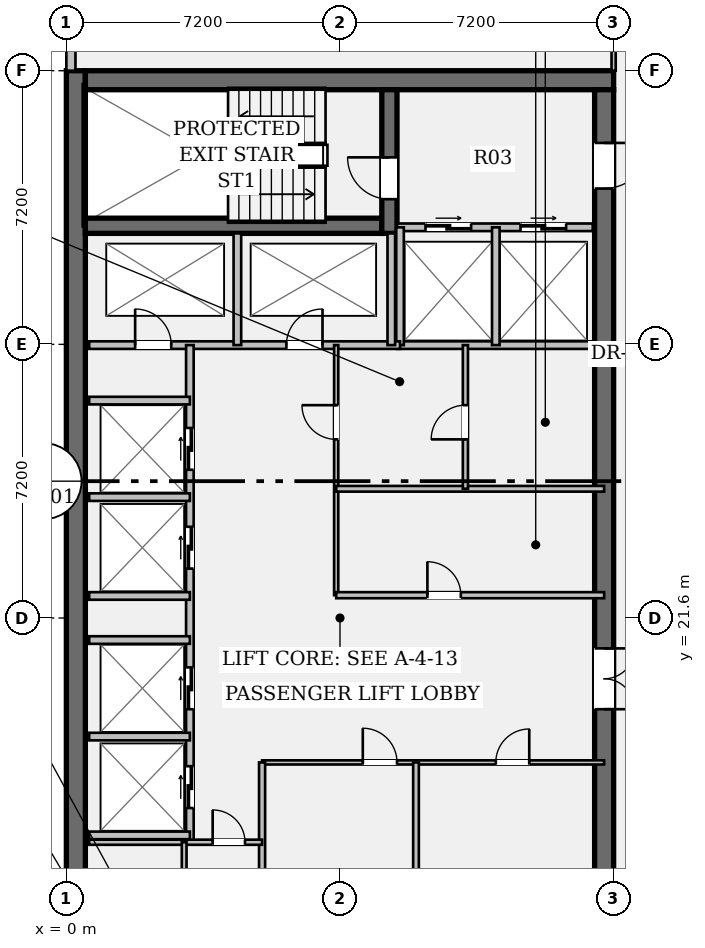
"""IFC4 building model, lengths in metres.
Left out: names, types, materials, properties, quantities, classifications, styles, units other than length and angle.
Written with IfcOpenShell. Run it as: python <this file> out.ifc"""

import sys

from ifc_helpers import new_model, si_unit, direction, frame, frame_2d, origin, place, context, subcontext, project, spatial, rectangle, extrude, element, fill, save


model = new_model("IFC4")
c1 = context("Model", 3, precision=1e-05, world=origin(), true_north=direction((0.0, 1.0)))
c2 = subcontext(c1, "Body", "Model", "MODEL_VIEW")
j1 = project(units=[si_unit("LENGTHUNIT", "METRE"), si_unit("PLANEANGLEUNIT", "RADIAN")], contexts=[c1])
p1 = place(None, origin())
s1 = spatial("IfcSite", under=j1, at=p1, CompositionType="ELEMENT")
p2 = place(p1, origin())
s2 = spatial("IfcBuilding", under=s1, at=p2, CompositionType="ELEMENT")
p3 = place(p2, frame((0.0, 0.0, 255.15)))
s3 = spatial("IfcBuildingStorey", under=s2, at=p3, CompositionType="ELEMENT", Elevation=255.15)
p4 = place(p3, frame((0.25, 7.2, 0.0), z_axis=(0.0, 0.0, 1.0), x_axis=(0.0, 1.0, 0.0)))
e1 = element("IfcWall", 1, at=p4, inside=s3, PredefinedType="SHEAR", context=c2, shape_type="SweptSolid", body=[
    extrude(rectangle(XDim=28.8, YDim=0.5, at=frame_2d((14.4, 0.0))), origin(), (0.0, 0.0, 1.0), 3.24),
])
p5 = place(p3, frame((0.5, 35.75, 0.0), z_axis=(0.0, 0.0, 1.0), x_axis=(1.0, 0.0, 0.0)))
e2 = element("IfcWall", 2, at=p5, inside=s3, PredefinedType="SHEAR", context=c2, shape_type="SweptSolid", body=[
    extrude(rectangle(XDim=13.9, YDim=0.5, at=frame_2d((6.95, 0.0))), origin(), (0.0, 0.0, 1.0), 3.24),
])
p6 = place(p3, frame((14.15, 35.5, 0.0), z_axis=(0.0, 0.0, 1.0), x_axis=(0.0, -1.0, 0.0)))
e3 = element("IfcWall", 3, at=p6, inside=s3, PredefinedType="SHEAR", context=c2, shape_type="SweptSolid", body=[
    extrude(rectangle(XDim=27.8, YDim=0.5, at=frame_2d((13.9, 0.0))), origin(), (0.0, 0.0, 1.0), 3.24),
])
p7 = place(p6, frame((1.4, 0.0, 0.0)))
e4 = element("IfcOpeningElement", 4, at=p7, cuts=e3, PredefinedType="OPENING", context=c2, shape_type="SweptSolid", body=[
    extrude(rectangle(XDim=1.2, YDim=2.15, at=frame_2d((0.6, 1.075))), frame((0.0, 0.262, 0.0), z_axis=(0.0, -1.0, 0.0), x_axis=(1.0, 0.0, 0.0)), (0.0, 0.0, 1.0), 0.524),
])
p8 = place(p6, frame((25.35, 0.0, 0.0)))
e5 = element("IfcOpeningElement", 5, at=p8, cuts=e3, PredefinedType="OPENING", context=c2, shape_type="SweptSolid", body=[
    extrude(rectangle(XDim=1.2, YDim=2.15, at=frame_2d((0.6, 1.075))), frame((0.0, 0.262, 0.0), z_axis=(0.0, -1.0, 0.0), x_axis=(1.0, 0.0, 0.0)), (0.0, 0.0, 1.0), 0.524),
])
p9 = place(p6, frame((14.7, 0.0, 0.0)))
e6 = element("IfcOpeningElement", 6, at=p9, cuts=e3, PredefinedType="OPENING", context=c2, shape_type="SweptSolid", body=[
    extrude(rectangle(XDim=1.6, YDim=2.2, at=frame_2d((0.8, 1.1))), frame((0.0, 0.262, 0.0), z_axis=(0.0, -1.0, 0.0), x_axis=(1.0, 0.0, 0.0)), (0.0, 0.0, 1.0), 0.524),
])
p10 = place(p3, frame((0.5, 31.92, 0.0), z_axis=(0.0, 0.0, 1.0), x_axis=(1.0, 0.0, 0.0)))
e7 = element("IfcWall", 7, at=p10, inside=s3, PredefinedType="SHEAR", context=c2, shape_type="SweptSolid", body=[
    extrude(rectangle(XDim=7.8, YDim=0.4, at=frame_2d((3.9, 0.0))), origin(), (0.0, 0.0, 1.0), 3.24),
])
p11 = place(p3, frame((8.5, 31.72, 0.0), z_axis=(0.0, 0.0, 1.0), x_axis=(0.0, 1.0, 0.0)))
e8 = element("IfcWall", 8, at=p11, inside=s3, PredefinedType="SHEAR", context=c2, shape_type="SweptSolid", body=[
    extrude(rectangle(XDim=3.78, YDim=0.4, at=frame_2d((1.89, 0.0))), origin(), (0.0, 0.0, 1.0), 3.24),
])
p12 = place(p11, frame((0.9, 0.0, 0.0)))
e9 = element("IfcOpeningElement", 9, at=p12, cuts=e8, PredefinedType="OPENING", context=c2, shape_type="SweptSolid", body=[
    extrude(rectangle(XDim=1.1, YDim=2.15, at=frame_2d((0.55, 1.075))), frame((0.0, 0.212, 0.0), z_axis=(0.0, -1.0, 0.0), x_axis=(1.0, 0.0, 0.0)), (0.0, 0.0, 1.0), 0.424),
])
p13 = place(p3, frame((0.12, 36.0, 0.0), z_axis=(0.0, 0.0, 1.0), x_axis=(0.0, 1.0, 0.0)))
e10 = element("IfcWall", 10, at=p13, inside=s3, PredefinedType="STANDARD", context=c2, shape_type="SweptSolid", body=[
    extrude(rectangle(XDim=1.33, YDim=0.24, at=frame_2d((0.665, 0.0))), origin(), (0.0, 0.0, 1.0), 3.24),
])
p14 = place(p3, frame((8.7, 31.88, 0.0), z_axis=(0.0, 0.0, 1.0), x_axis=(1.0, 0.0, 0.0)))
e11 = element("IfcWall", 11, at=p14, inside=s3, PredefinedType="PARTITIONING", context=c2, shape_type="SweptSolid", body=[
    extrude(rectangle(XDim=5.15, YDim=0.2, at=frame_2d((2.575, 0.0))), origin(), (0.0, 0.0, 1.0), 3.24),
])
p15 = place(p14, frame((0.75, 0.0, 0.0)))
e12 = element("IfcOpeningElement", 12, at=p15, cuts=e11, PredefinedType="OPENING", context=c2, shape_type="SweptSolid", body=[
    extrude(rectangle(XDim=1.2, YDim=2.2, at=frame_2d((0.6, 1.1))), frame((0.0, 0.112, 0.0), z_axis=(0.0, -1.0, 0.0), x_axis=(1.0, 0.0, 0.0)), (0.0, 0.0, 1.0), 0.224),
])
p16 = place(p14, frame((3.25, 0.0, 0.0)))
e13 = element("IfcOpeningElement", 13, at=p16, cuts=e11, PredefinedType="OPENING", context=c2, shape_type="SweptSolid", body=[
    extrude(rectangle(XDim=1.2, YDim=2.2, at=frame_2d((0.6, 1.1))), frame((0.0, 0.112, 0.0), z_axis=(0.0, -1.0, 0.0), x_axis=(1.0, 0.0, 0.0)), (0.0, 0.0, 1.0), 0.224),
])
p17 = place(p3, frame((8.7, 28.78, 0.0), z_axis=(0.0, 0.0, 1.0), x_axis=(1.0, 0.0, 0.0)))
e14 = element("IfcWall", 14, at=p17, inside=s3, PredefinedType="PARTITIONING", context=c2, shape_type="SweptSolid", body=[
    extrude(rectangle(XDim=5.15, YDim=0.2, at=frame_2d((2.575, 0.0))), origin(), (0.0, 0.0, 1.0), 3.24),
])
for number, where, z_axis, x_axis in (
    (15, (8.78, 28.78, 0.0), (0.0, 0.0, 1.0), (0.0, 1.0, 0.0)),
    (16, (11.3, 28.78, 0.0), (0.0, 0.0, 1.0), (0.0, 1.0, 0.0)),
):
    element("IfcWall", number, at=place(p3, frame(where, z_axis=z_axis, x_axis=x_axis)), inside=s3, PredefinedType="PARTITIONING", context=c2, shape_type="SweptSolid", body=[
        extrude(rectangle(XDim=3.1, YDim=0.2, at=frame_2d((1.55, 0.0))), origin(), (0.0, 0.0, 1.0), 3.24),
    ])
p18 = place(p3, frame((0.6, 28.78, 0.0), z_axis=(0.0, 0.0, 1.0), x_axis=(1.0, 0.0, 0.0)))
e17 = element("IfcWall", 17, at=p18, inside=s3, PredefinedType="PARTITIONING", context=c2, shape_type="SweptSolid", body=[
    extrude(rectangle(XDim=8.18, YDim=0.2, at=frame_2d((4.09, 0.0))), origin(), (0.0, 0.0, 1.0), 3.24),
])
p19 = place(p18, frame((1.21, 0.0, 0.0)))
e18 = element("IfcOpeningElement", 18, at=p19, cuts=e17, PredefinedType="OPENING", context=c2, shape_type="SweptSolid", body=[
    extrude(rectangle(XDim=0.95, YDim=2.15, at=frame_2d((0.475, 1.075))), frame((0.0, 0.112, 0.0), z_axis=(0.0, -1.0, 0.0), x_axis=(1.0, 0.0, 0.0)), (0.0, 0.0, 1.0), 0.224),
])
p20 = place(p18, frame((5.19, 0.0, 0.0)))
e19 = element("IfcOpeningElement", 19, at=p20, cuts=e17, PredefinedType="OPENING", context=c2, shape_type="SweptSolid", body=[
    extrude(rectangle(XDim=0.95, YDim=2.15, at=frame_2d((0.475, 1.075))), frame((0.0, 0.112, 0.0), z_axis=(0.0, -1.0, 0.0), x_axis=(1.0, 0.0, 0.0)), (0.0, 0.0, 1.0), 0.224),
])
for number, where, z_axis, x_axis in (
    (20, (4.5, 28.78, 0.0), (0.0, 0.0, 1.0), (0.0, 1.0, 0.0)),
    (21, (8.55, 28.78, 0.0), (0.0, 0.0, 1.0), (0.0, 1.0, 0.0)),
):
    element("IfcWall", number, at=place(p3, frame(where, z_axis=z_axis, x_axis=x_axis)), inside=s3, PredefinedType="PARTITIONING", context=c2, shape_type="SweptSolid", body=[
        extrude(rectangle(XDim=2.94, YDim=0.2, at=frame_2d((1.47, 0.0))), origin(), (0.0, 0.0, 1.0), 3.24),
    ])
p21 = place(p3, frame((3.25, 15.7, 0.0), z_axis=(0.0, 0.0, 1.0), x_axis=(0.0, 1.0, 0.0)))
e22 = element("IfcWall", 22, at=p21, inside=s3, PredefinedType="PARTITIONING", context=c2, shape_type="SweptSolid", body=[
    extrude(rectangle(XDim=13.08, YDim=0.2, at=frame_2d((6.54, 0.0))), origin(), (0.0, 0.0, 1.0), 3.24),
])
p22 = place(p21, frame((0.9, 0.0, 0.0)))
e23 = element("IfcOpeningElement", 23, at=p22, cuts=e22, PredefinedType="OPENING", context=c2, shape_type="SweptSolid", body=[
    extrude(rectangle(XDim=1.1, YDim=2.2, at=frame_2d((0.55, 1.1))), frame((0.0, 0.112, 0.0), z_axis=(0.0, -1.0, 0.0), x_axis=(1.0, 0.0, 0.0)), (0.0, 0.0, 1.0), 0.224),
])
p23 = place(p21, frame((3.5, 0.0, 0.0)))
e24 = element("IfcOpeningElement", 24, at=p23, cuts=e22, PredefinedType="OPENING", context=c2, shape_type="SweptSolid", body=[
    extrude(rectangle(XDim=1.1, YDim=2.2, at=frame_2d((0.55, 1.1))), frame((0.0, 0.112, 0.0), z_axis=(0.0, -1.0, 0.0), x_axis=(1.0, 0.0, 0.0)), (0.0, 0.0, 1.0), 0.224),
])
p24 = place(p21, frame((7.2, 0.0, 0.0)))
e25 = element("IfcOpeningElement", 25, at=p24, cuts=e22, PredefinedType="OPENING", context=c2, shape_type="SweptSolid", body=[
    extrude(rectangle(XDim=1.1, YDim=2.2, at=frame_2d((0.55, 1.1))), frame((0.0, 0.112, 0.0), z_axis=(0.0, -1.0, 0.0), x_axis=(1.0, 0.0, 0.0)), (0.0, 0.0, 1.0), 0.224),
])
p25 = place(p21, frame((9.8, 0.0, 0.0)))
e26 = element("IfcOpeningElement", 26, at=p25, cuts=e22, PredefinedType="OPENING", context=c2, shape_type="SweptSolid", body=[
    extrude(rectangle(XDim=1.1, YDim=2.2, at=frame_2d((0.55, 1.1))), frame((0.0, 0.112, 0.0), z_axis=(0.0, -1.0, 0.0), x_axis=(1.0, 0.0, 0.0)), (0.0, 0.0, 1.0), 0.224),
])
for number, where, z_axis, x_axis in (
    (27, (0.6, 15.88, 0.0), (0.0, 0.0, 1.0), (1.0, 0.0, 0.0)),
    (28, (0.6, 18.48, 0.0), (0.0, 0.0, 1.0), (1.0, 0.0, 0.0)),
    (29, (0.6, 22.18, 0.0), (0.0, 0.0, 1.0), (1.0, 0.0, 0.0)),
    (30, (0.6, 24.78, 0.0), (0.0, 0.0, 1.0), (1.0, 0.0, 0.0)),
    (31, (0.6, 21.02, 0.0), (0.0, 0.0, 1.0), (1.0, 0.0, 0.0)),
    (32, (0.6, 27.32, 0.0), (0.0, 0.0, 1.0), (1.0, 0.0, 0.0)),
):
    element("IfcWall", number, at=place(p3, frame(where, z_axis=z_axis, x_axis=x_axis)), inside=s3, PredefinedType="PARTITIONING", context=c2, shape_type="SweptSolid", body=[
        extrude(rectangle(XDim=2.65, YDim=0.2, at=frame_2d((1.325, 0.0))), origin(), (0.0, 0.0, 1.0), 3.24),
    ])
p26 = place(p3, frame((7.1, 22.2, 0.0), z_axis=(0.0, 0.0, 1.0), x_axis=(0.0, 1.0, 0.0)))
e33 = element("IfcWall", 33, at=p26, inside=s3, PredefinedType="PARTITIONING", context=c2, shape_type="SweptSolid", body=[
    extrude(rectangle(XDim=6.58, YDim=0.11, at=frame_2d((3.29, 0.0))), origin(), (0.0, 0.0, 1.0), 3.24),
])
p27 = place(p26, frame((4.1, 0.0, 0.0)))
e34 = element("IfcOpeningElement", 34, at=p27, cuts=e33, PredefinedType="OPENING", context=c2, shape_type="SweptSolid", body=[
    extrude(rectangle(XDim=0.9, YDim=2.15, at=frame_2d((0.45, 1.075))), frame((0.0, 0.067, 0.0), z_axis=(0.0, -1.0, 0.0), x_axis=(1.0, 0.0, 0.0)), (0.0, 0.0, 1.0), 0.134),
])
p28 = place(p3, frame((7.1, 22.2, 0.0), z_axis=(0.0, 0.0, 1.0), x_axis=(1.0, 0.0, 0.0)))
e35 = element("IfcWall", 35, at=p28, inside=s3, PredefinedType="PARTITIONING", context=c2, shape_type="SweptSolid", body=[
    extrude(rectangle(XDim=7.05, YDim=0.16, at=frame_2d((3.525, 0.0))), origin(), (0.0, 0.0, 1.0), 3.24),
])
p29 = place(p28, frame((2.4, 0.0, 0.0)))
e36 = element("IfcOpeningElement", 36, at=p29, cuts=e35, PredefinedType="OPENING", context=c2, shape_type="SweptSolid", body=[
    extrude(rectangle(XDim=0.88, YDim=2.15, at=frame_2d((0.44, 1.075))), frame((0.0, 0.092, 0.0), z_axis=(0.0, -1.0, 0.0), x_axis=(1.0, 0.0, 0.0)), (0.0, 0.0, 1.0), 0.184),
])
p30 = place(p3, frame((7.1, 25.0, 0.0), z_axis=(0.0, 0.0, 1.0), x_axis=(1.0, 0.0, 0.0)))
e37 = element("IfcWall", 37, at=p30, inside=s3, PredefinedType="PARTITIONING", context=c2, shape_type="SweptSolid", body=[
    extrude(rectangle(XDim=7.05, YDim=0.15, at=frame_2d((3.525, 0.0))), origin(), (0.0, 0.0, 1.0), 3.24),
])
p31 = place(p3, frame((10.5, 25.0, 0.0), z_axis=(0.0, 0.0, 1.0), x_axis=(0.0, 1.0, 0.0)))
e38 = element("IfcWall", 38, at=p31, inside=s3, PredefinedType="PARTITIONING", context=c2, shape_type="SweptSolid", body=[
    extrude(rectangle(XDim=3.78, YDim=0.135, at=frame_2d((1.89, 0.0))), origin(), (0.0, 0.0, 1.0), 3.24),
])
p32 = place(p31, frame((1.3, 0.0, 0.0)))
e39 = element("IfcOpeningElement", 39, at=p32, cuts=e38, PredefinedType="OPENING", context=c2, shape_type="SweptSolid", body=[
    extrude(rectangle(XDim=0.9, YDim=2.15, at=frame_2d((0.45, 1.075))), frame((0.0, 0.08, 0.0), z_axis=(0.0, -1.0, 0.0), x_axis=(1.0, 0.0, 0.0)), (0.0, 0.0, 1.0), 0.159),
])
p33 = place(p3, frame((5.15, 17.8, 0.0), z_axis=(0.0, 0.0, 1.0), x_axis=(1.0, 0.0, 0.0)))
e40 = element("IfcWall", 40, at=p33, inside=s3, PredefinedType="PARTITIONING", context=c2, shape_type="SweptSolid", body=[
    extrude(rectangle(XDim=9.0, YDim=0.11, at=frame_2d((4.5, 0.0))), origin(), (0.0, 0.0, 1.0), 3.24),
])
p34 = place(p33, frame((2.65, 0.0, 0.0)))
e41 = element("IfcOpeningElement", 41, at=p34, cuts=e40, PredefinedType="OPENING", context=c2, shape_type="SweptSolid", body=[
    extrude(rectangle(XDim=0.9, YDim=2.15, at=frame_2d((0.45, 1.075))), frame((0.0, 0.067, 0.0), z_axis=(0.0, -1.0, 0.0), x_axis=(1.0, 0.0, 0.0)), (0.0, 0.0, 1.0), 0.134),
])
p35 = place(p33, frame((6.15, 0.0, 0.0)))
e42 = element("IfcOpeningElement", 42, at=p35, cuts=e40, PredefinedType="OPENING", context=c2, shape_type="SweptSolid", body=[
    extrude(rectangle(XDim=0.88, YDim=2.15, at=frame_2d((0.44, 1.075))), frame((0.0, 0.067, 0.0), z_axis=(0.0, -1.0, 0.0), x_axis=(1.0, 0.0, 0.0)), (0.0, 0.0, 1.0), 0.134),
])
p36 = place(p3, frame((5.15, 11.2, 0.0), z_axis=(0.0, 0.0, 1.0), x_axis=(0.0, 1.0, 0.0)))
e43 = element("IfcWall", 43, at=p36, inside=s3, PredefinedType="PARTITIONING", context=c2, shape_type="SweptSolid", body=[
    extrude(rectangle(XDim=6.6, YDim=0.16, at=frame_2d((3.3, 0.0))), origin(), (0.0, 0.0, 1.0), 3.24),
])
p37 = place(p3, frame((9.2, 11.2, 0.0), z_axis=(0.0, 0.0, 1.0), x_axis=(0.0, 1.0, 0.0)))
e44 = element("IfcWall", 44, at=p37, inside=s3, PredefinedType="PARTITIONING", context=c2, shape_type="SweptSolid", body=[
    extrude(rectangle(XDim=6.6, YDim=0.15, at=frame_2d((3.3, 0.0))), origin(), (0.0, 0.0, 1.0), 3.24),
])
p38 = place(p3, frame((0.6, 15.7, 0.0), z_axis=(0.0, 0.0, 1.0), x_axis=(1.0, 0.0, 0.0)))
e45 = element("IfcWall", 45, at=p38, inside=s3, PredefinedType="PARTITIONING", context=c2, shape_type="SweptSolid", body=[
    extrude(rectangle(XDim=4.55, YDim=0.135, at=frame_2d((2.275, 0.0))), origin(), (0.0, 0.0, 1.0), 3.24),
])
p39 = place(p38, frame((3.25, 0.0, 0.0)))
e46 = element("IfcOpeningElement", 46, at=p39, cuts=e45, PredefinedType="OPENING", context=c2, shape_type="SweptSolid", body=[
    extrude(rectangle(XDim=0.85, YDim=2.15, at=frame_2d((0.425, 1.075))), frame((0.0, 0.08, 0.0), z_axis=(0.0, -1.0, 0.0), x_axis=(1.0, 0.0, 0.0)), (0.0, 0.0, 1.0), 0.159),
])
p40 = place(p3, frame((3.1, 11.28, 0.0), z_axis=(0.0, 0.0, 1.0), x_axis=(0.0, 1.0, 0.0)))
e47 = element("IfcWall", 47, at=p40, inside=s3, PredefinedType="PARTITIONING", context=c2, shape_type="SweptSolid", body=[
    extrude(rectangle(XDim=4.42, YDim=0.125, at=frame_2d((2.21, 0.0))), origin(), (0.0, 0.0, 1.0), 3.24),
])
p41 = place(p40, frame((0.65, 0.0, 0.0)))
e48 = element("IfcOpeningElement", 48, at=p41, cuts=e47, PredefinedType="OPENING", context=c2, shape_type="SweptSolid", body=[
    extrude(rectangle(XDim=0.85, YDim=2.15, at=frame_2d((0.425, 1.075))), frame((0.0, 0.074, 0.0), z_axis=(0.0, -1.0, 0.0), x_axis=(1.0, 0.0, 0.0)), (0.0, 0.0, 1.0), 0.149),
])
p42 = place(p40, frame((2.75, 0.0, 0.0)))
e49 = element("IfcOpeningElement", 49, at=p42, cuts=e47, PredefinedType="OPENING", context=c2, shape_type="SweptSolid", body=[
    extrude(rectangle(XDim=0.85, YDim=2.15, at=frame_2d((0.425, 1.075))), frame((0.0, 0.074, 0.0), z_axis=(0.0, -1.0, 0.0), x_axis=(1.0, 0.0, 0.0)), (0.0, 0.0, 1.0), 0.149),
])
p43 = place(p3, frame((14.4, 36.0, 0.0), z_axis=(0.0, 0.0, 1.0), x_axis=(0.0, 1.0, 0.0)))
e50 = element("IfcWall", 50, at=p43, inside=s3, PredefinedType="PARTITIONING", context=c2, shape_type="SweptSolid", body=[
    extrude(rectangle(XDim=3.88, YDim=0.11, at=frame_2d((1.94, 0.0))), origin(), (0.0, 0.0, 1.0), 2.676),
])
p44 = place(p43, frame((0.65, 0.0, 0.0)))
e51 = element("IfcOpeningElement", 51, at=p44, cuts=e50, PredefinedType="OPENING", context=c2, shape_type="SweptSolid", body=[
    extrude(rectangle(XDim=0.9, YDim=2.15, at=frame_2d((0.45, 1.075))), frame((0.0, 0.067, 0.0), z_axis=(0.0, -1.0, 0.0), x_axis=(1.0, 0.0, 0.0)), (0.0, 0.0, 1.0), 0.134),
])
p45 = place(p12, origin())
e52 = element("IfcDoor", 52, at=p45, inside=s3, OperationType="SINGLE_SWING_RIGHT", PredefinedType="DOOR", context=c2, shape_type="SweptSolid", body=[
    extrude(rectangle(XDim=1.1, YDim=2.15, at=frame_2d((0.55, 1.075))), frame((0.0, 0.025, 0.0), z_axis=(0.0, -1.0, 0.0), x_axis=(1.0, 0.0, 0.0)), (0.0, 0.0, 1.0), 0.05),
])
fill(e9, e52)
p46 = place(p7, origin())
e53 = element("IfcDoor", 53, at=p46, inside=s3, OperationType="SINGLE_SWING_LEFT", PredefinedType="DOOR", context=c2, shape_type="SweptSolid", body=[
    extrude(rectangle(XDim=1.2, YDim=2.15, at=frame_2d((0.6, 1.075))), frame((0.0, 0.025, 0.0), z_axis=(0.0, -1.0, 0.0), x_axis=(1.0, 0.0, 0.0)), (0.0, 0.0, 1.0), 0.05),
])
fill(e4, e53)
p47 = place(p15, origin())
e54 = element("IfcDoor", 54, at=p47, inside=s3, OperationType="DOUBLE_DOOR_SLIDING", PredefinedType="DOOR", context=c2, shape_type="SweptSolid", body=[
    extrude(rectangle(XDim=1.2, YDim=2.2, at=frame_2d((0.6, 1.1))), frame((0.0, 0.025, 0.0), z_axis=(0.0, -1.0, 0.0), x_axis=(1.0, 0.0, 0.0)), (0.0, 0.0, 1.0), 0.05),
])
fill(e12, e54)
p48 = place(p16, origin())
e55 = element("IfcDoor", 55, at=p48, inside=s3, OperationType="DOUBLE_DOOR_SLIDING", PredefinedType="DOOR", context=c2, shape_type="SweptSolid", body=[
    extrude(rectangle(XDim=1.2, YDim=2.2, at=frame_2d((0.6, 1.1))), frame((0.0, 0.025, 0.0), z_axis=(0.0, -1.0, 0.0), x_axis=(1.0, 0.0, 0.0)), (0.0, 0.0, 1.0), 0.05),
])
fill(e13, e55)
p49 = place(p19, origin())
e56 = element("IfcDoor", 56, at=p49, inside=s3, OperationType="SINGLE_SWING_LEFT", PredefinedType="DOOR", context=c2, shape_type="SweptSolid", body=[
    extrude(rectangle(XDim=0.95, YDim=2.15, at=frame_2d((0.475, 1.075))), frame((0.0, 0.025, 0.0), z_axis=(0.0, -1.0, 0.0), x_axis=(1.0, 0.0, 0.0)), (0.0, 0.0, 1.0), 0.05),
])
fill(e18, e56)
p50 = place(p20, origin())
e57 = element("IfcDoor", 57, at=p50, inside=s3, OperationType="SINGLE_SWING_RIGHT", PredefinedType="DOOR", context=c2, shape_type="SweptSolid", body=[
    extrude(rectangle(XDim=0.95, YDim=2.15, at=frame_2d((0.475, 1.075))), frame((0.0, 0.025, 0.0), z_axis=(0.0, -1.0, 0.0), x_axis=(1.0, 0.0, 0.0)), (0.0, 0.0, 1.0), 0.05),
])
fill(e19, e57)
p51 = place(p9, origin())
e58 = element("IfcDoor", 58, at=p51, inside=s3, OperationType="DOUBLE_DOOR_SINGLE_SWING", PredefinedType="DOOR", context=c2, shape_type="SweptSolid", body=[
    extrude(rectangle(XDim=1.6, YDim=2.2, at=frame_2d((0.8, 1.1))), frame((0.0, 0.025, 0.0), z_axis=(0.0, -1.0, 0.0), x_axis=(1.0, 0.0, 0.0)), (0.0, 0.0, 1.0), 0.05),
])
fill(e6, e58)
p52 = place(p22, origin())
e59 = element("IfcDoor", 59, at=p52, inside=s3, OperationType="DOUBLE_DOOR_SLIDING", PredefinedType="DOOR", context=c2, shape_type="SweptSolid", body=[
    extrude(rectangle(XDim=1.1, YDim=2.2, at=frame_2d((0.55, 1.1))), frame((0.0, 0.025, 0.0), z_axis=(0.0, -1.0, 0.0), x_axis=(1.0, 0.0, 0.0)), (0.0, 0.0, 1.0), 0.05),
])
fill(e23, e59)
p53 = place(p23, origin())
e60 = element("IfcDoor", 60, at=p53, inside=s3, OperationType="DOUBLE_DOOR_SLIDING", PredefinedType="DOOR", context=c2, shape_type="SweptSolid", body=[
    extrude(rectangle(XDim=1.1, YDim=2.2, at=frame_2d((0.55, 1.1))), frame((0.0, 0.025, 0.0), z_axis=(0.0, -1.0, 0.0), x_axis=(1.0, 0.0, 0.0)), (0.0, 0.0, 1.0), 0.05),
])
fill(e24, e60)
p54 = place(p24, origin())
e61 = element("IfcDoor", 61, at=p54, inside=s3, OperationType="DOUBLE_DOOR_SLIDING", PredefinedType="DOOR", context=c2, shape_type="SweptSolid", body=[
    extrude(rectangle(XDim=1.1, YDim=2.2, at=frame_2d((0.55, 1.1))), frame((0.0, 0.025, 0.0), z_axis=(0.0, -1.0, 0.0), x_axis=(1.0, 0.0, 0.0)), (0.0, 0.0, 1.0), 0.05),
])
fill(e25, e61)
p55 = place(p25, origin())
e62 = element("IfcDoor", 62, at=p55, inside=s3, OperationType="DOUBLE_DOOR_SLIDING", PredefinedType="DOOR", context=c2, shape_type="SweptSolid", body=[
    extrude(rectangle(XDim=1.1, YDim=2.2, at=frame_2d((0.55, 1.1))), frame((0.0, 0.025, 0.0), z_axis=(0.0, -1.0, 0.0), x_axis=(1.0, 0.0, 0.0)), (0.0, 0.0, 1.0), 0.05),
])
fill(e26, e62)
p56 = place(p29, origin())
e63 = element("IfcDoor", 63, at=p56, inside=s3, OperationType="SINGLE_SWING_LEFT", PredefinedType="DOOR", context=c2, shape_type="SweptSolid", body=[
    extrude(rectangle(XDim=0.88, YDim=2.15, at=frame_2d((0.44, 1.075))), frame((0.0, 0.025, 0.0), z_axis=(0.0, -1.0, 0.0), x_axis=(1.0, 0.0, 0.0)), (0.0, 0.0, 1.0), 0.05),
])
fill(e36, e63)
p57 = place(p27, origin())
e64 = element("IfcDoor", 64, at=p57, inside=s3, OperationType="SINGLE_SWING_RIGHT", PredefinedType="DOOR", context=c2, shape_type="SweptSolid", body=[
    extrude(rectangle(XDim=0.9, YDim=2.15, at=frame_2d((0.45, 1.075))), frame((0.0, 0.025, 0.0), z_axis=(0.0, -1.0, 0.0), x_axis=(1.0, 0.0, 0.0)), (0.0, 0.0, 1.0), 0.05),
])
fill(e34, e64)
p58 = place(p32, origin())
e65 = element("IfcDoor", 65, at=p58, inside=s3, OperationType="SINGLE_SWING_LEFT", PredefinedType="DOOR", context=c2, shape_type="SweptSolid", body=[
    extrude(rectangle(XDim=0.9, YDim=2.15, at=frame_2d((0.45, 1.075))), frame((0.0, 0.025, 0.0), z_axis=(0.0, -1.0, 0.0), x_axis=(1.0, 0.0, 0.0)), (0.0, 0.0, 1.0), 0.05),
])
fill(e39, e65)
p59 = place(p34, origin())
e66 = element("IfcDoor", 66, at=p59, inside=s3, OperationType="SINGLE_SWING_LEFT", PredefinedType="DOOR", context=c2, shape_type="SweptSolid", body=[
    extrude(rectangle(XDim=0.9, YDim=2.15, at=frame_2d((0.45, 1.075))), frame((0.0, 0.025, 0.0), z_axis=(0.0, -1.0, 0.0), x_axis=(1.0, 0.0, 0.0)), (0.0, 0.0, 1.0), 0.05),
])
fill(e41, e66)
p60 = place(p35, origin())
e67 = element("IfcDoor", 67, at=p60, inside=s3, OperationType="SINGLE_SWING_RIGHT", PredefinedType="DOOR", context=c2, shape_type="SweptSolid", body=[
    extrude(rectangle(XDim=0.88, YDim=2.15, at=frame_2d((0.44, 1.075))), frame((0.0, 0.025, 0.0), z_axis=(0.0, -1.0, 0.0), x_axis=(1.0, 0.0, 0.0)), (0.0, 0.0, 1.0), 0.05),
])
fill(e42, e67)
p61 = place(p39, origin())
e68 = element("IfcDoor", 68, at=p61, inside=s3, OperationType="SINGLE_SWING_LEFT", PredefinedType="DOOR", context=c2, shape_type="SweptSolid", body=[
    extrude(rectangle(XDim=0.85, YDim=2.15, at=frame_2d((0.425, 1.075))), frame((0.0, 0.025, 0.0), z_axis=(0.0, -1.0, 0.0), x_axis=(1.0, 0.0, 0.0)), (0.0, 0.0, 1.0), 0.05),
])
fill(e46, e68)
save(model, sys.argv[1])
